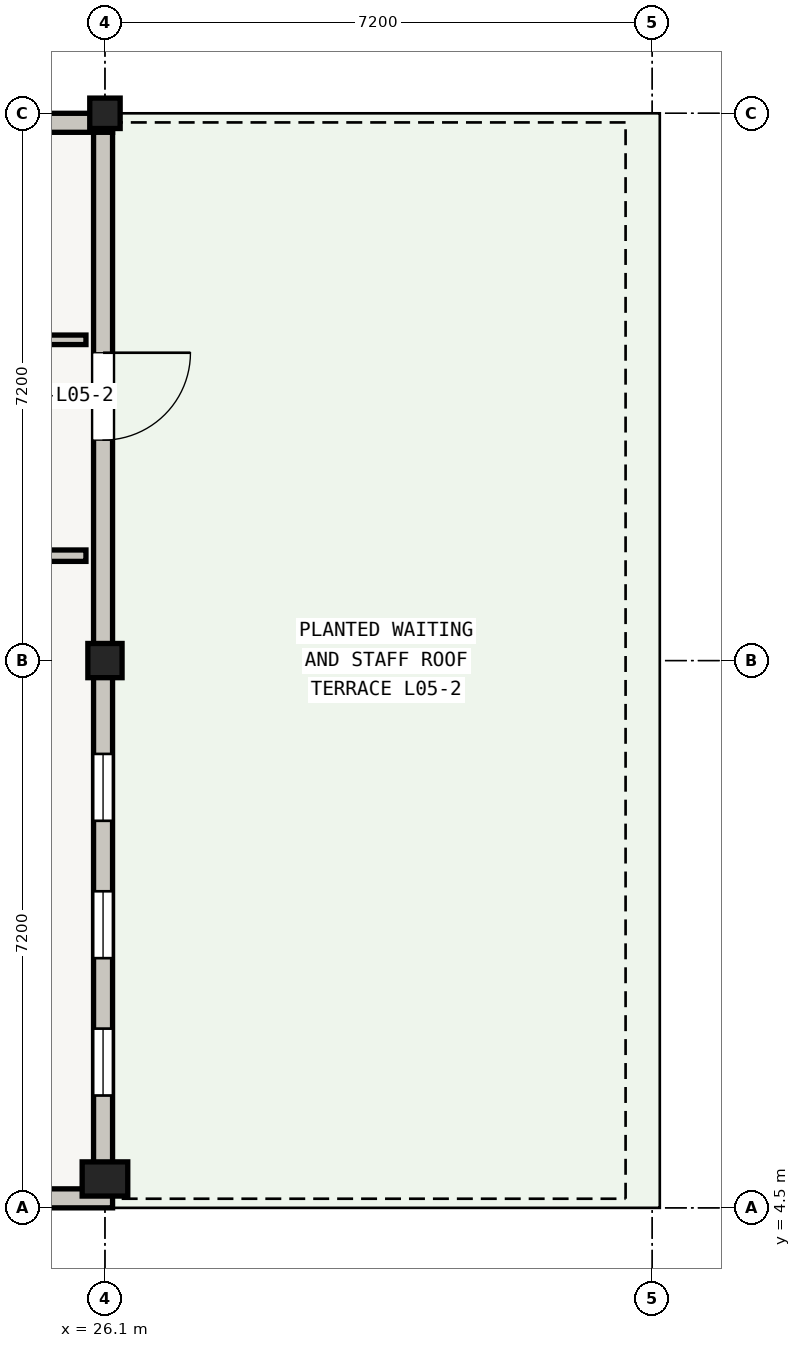
"""IFC4 building model, lengths in metres.
Left out: names, types, materials, properties, quantities, classifications, styles, units other than length and angle.
Written with IfcOpenShell. Run it as: python <this file> out.ifc"""

import sys

from ifc_helpers import new_model, si_unit, direction, frame, frame_2d, origin, origin_2d, place, context, subcontext, project, spatial, rectangle, extrude, element, fill, save


model = new_model("IFC4")
c1 = context("Model", 3, precision=1e-05, world=origin(), true_north=direction((0.0, 1.0)))
c2 = subcontext(c1, "Body", "Model", "MODEL_VIEW")
j1 = project(units=[si_unit("LENGTHUNIT", "METRE"), si_unit("PLANEANGLEUNIT", "RADIAN")], contexts=[c1])
p1 = place(None, origin())
s1 = spatial("IfcSite", under=j1, at=p1, CompositionType="ELEMENT")
p2 = place(p1, origin())
s2 = spatial("IfcBuilding", under=s1, at=p2, CompositionType="ELEMENT")
p3 = place(p2, frame((0.0, 0.0, 21.15)))
s3 = spatial("IfcBuildingStorey", under=s2, at=p3, CompositionType="ELEMENT", Elevation=21.15)
p4 = place(p3, frame((26.1, 4.88, 0.0), z_axis=(0.0, 0.0, 1.0), x_axis=(1.0, 0.0, 0.0)))
e1 = element("IfcColumn", 1, at=p4, inside=s3, PredefinedType="COLUMN", context=c2, shape_type="SweptSolid", body=[
    extrude(rectangle(XDim=0.6, YDim=0.45, at=origin_2d()), origin(), (0.0, 0.0, 1.0), 3.62),
])
p5 = place(p3, frame((26.1, 11.7, 0.0), z_axis=(0.0, 0.0, 1.0), x_axis=(1.0, 0.0, 0.0)))
e2 = element("IfcColumn", 2, at=p5, inside=s3, PredefinedType="COLUMN", context=c2, shape_type="SweptSolid", body=[
    extrude(rectangle(XDim=0.45, YDim=0.45, at=origin_2d()), origin(), (0.0, 0.0, 1.0), 3.62),
])
p6 = place(p3, frame((26.1, 18.9, 0.0), z_axis=(0.0, 0.0, 1.0), x_axis=(1.0, 0.0, 0.0)))
e3 = element("IfcColumn", 3, at=p6, inside=s3, PredefinedType="COLUMN", context=c2, shape_type="SweptSolid", body=[
    extrude(rectangle(XDim=0.4, YDim=0.4, at=origin_2d()), origin(), (0.0, 0.0, 1.0), 3.62),
])
p7 = place(p3, frame((18.9, 18.775, 0.0), z_axis=(0.0, 0.0, 1.0), x_axis=(1.0, 0.0, 0.0)))
e4 = element("IfcWall", 4, at=p7, inside=s3, PredefinedType="STANDARD", context=c2, shape_type="SweptSolid", body=[
    extrude(rectangle(XDim=7.3, YDim=0.25, at=frame_2d((3.65, 0.0))), origin(), (0.0, 0.0, 1.0), 2.655),
])
p8 = place(p7, frame((1.432, 0.0, 0.55)))
e5 = element("IfcOpeningElement", 5, at=p8, cuts=e4, PredefinedType="OPENING", context=c2, shape_type="SweptSolid", body=[
    extrude(rectangle(XDim=0.64, YDim=1.85, at=frame_2d((0.32, 0.925))), frame((0.0, 0.125, 0.0), z_axis=(0.0, -1.0, 0.0), x_axis=(1.0, 0.0, 0.0)), (0.0, 0.0, 1.0), 0.25),
])
p9 = place(p7, frame((3.33, 0.0, 0.55)))
e6 = element("IfcOpeningElement", 6, at=p9, cuts=e4, PredefinedType="OPENING", context=c2, shape_type="SweptSolid", body=[
    extrude(rectangle(XDim=0.64, YDim=1.85, at=frame_2d((0.32, 0.925))), frame((0.0, 0.125, 0.0), z_axis=(0.0, -1.0, 0.0), x_axis=(1.0, 0.0, 0.0)), (0.0, 0.0, 1.0), 0.25),
])
p10 = place(p7, frame((5.228, 0.0, 0.55)))
e7 = element("IfcOpeningElement", 7, at=p10, cuts=e4, PredefinedType="OPENING", context=c2, shape_type="SweptSolid", body=[
    extrude(rectangle(XDim=0.64, YDim=1.85, at=frame_2d((0.32, 0.925))), frame((0.0, 0.125, 0.0), z_axis=(0.0, -1.0, 0.0), x_axis=(1.0, 0.0, 0.0)), (0.0, 0.0, 1.0), 0.25),
])
p11 = place(p3, frame((26.075, 18.65, 0.0), z_axis=(0.0, 0.0, 1.0), x_axis=(0.0, -1.0, 0.0)))
e8 = element("IfcWall", 8, at=p11, inside=s3, PredefinedType="STANDARD", context=c2, shape_type="SweptSolid", body=[
    extrude(rectangle(XDim=6.95, YDim=0.25, at=frame_2d((3.475, 0.0))), origin(), (0.0, 0.0, 1.0), 2.655),
])
p12 = place(p11, frame((2.9, 0.0, 0.19)))
e9 = element("IfcOpeningElement", 9, at=p12, cuts=e8, PredefinedType="OPENING", context=c2, shape_type="SweptSolid", body=[
    extrude(rectangle(XDim=1.15, YDim=2.02, at=frame_2d((0.575, 1.01))), frame((0.0, 0.125, 0.0), z_axis=(0.0, -1.0, 0.0), x_axis=(1.0, 0.0, 0.0)), (0.0, 0.0, 1.0), 0.25),
])
p13 = place(p3, frame((26.075, 11.7, 0.0), z_axis=(0.0, 0.0, 1.0), x_axis=(0.0, -1.0, 0.0)))
e10 = element("IfcWall", 10, at=p13, inside=s3, PredefinedType="STANDARD", context=c2, shape_type="SweptSolid", body=[
    extrude(rectangle(XDim=6.95, YDim=0.25, at=frame_2d((3.475, 0.0))), origin(), (0.0, 0.0, 1.0), 2.655),
])
p14 = place(p13, frame((1.228, 0.0, 0.55)))
e11 = element("IfcOpeningElement", 11, at=p14, cuts=e10, PredefinedType="OPENING", context=c2, shape_type="SweptSolid", body=[
    extrude(rectangle(XDim=0.88, YDim=1.8, at=frame_2d((0.44, 0.9))), frame((0.0, 0.125, 0.0), z_axis=(0.0, -1.0, 0.0), x_axis=(1.0, 0.0, 0.0)), (0.0, 0.0, 1.0), 0.25),
])
p15 = place(p13, frame((3.035, 0.0, 0.55)))
e12 = element("IfcOpeningElement", 12, at=p15, cuts=e10, PredefinedType="OPENING", context=c2, shape_type="SweptSolid", body=[
    extrude(rectangle(XDim=0.88, YDim=1.8, at=frame_2d((0.44, 0.9))), frame((0.0, 0.125, 0.0), z_axis=(0.0, -1.0, 0.0), x_axis=(1.0, 0.0, 0.0)), (0.0, 0.0, 1.0), 0.25),
])
p16 = place(p13, frame((4.842, 0.0, 0.55)))
e13 = element("IfcOpeningElement", 13, at=p16, cuts=e10, PredefinedType="OPENING", context=c2, shape_type="SweptSolid", body=[
    extrude(rectangle(XDim=0.88, YDim=1.8, at=frame_2d((0.44, 0.9))), frame((0.0, 0.125, 0.0), z_axis=(0.0, -1.0, 0.0), x_axis=(1.0, 0.0, 0.0)), (0.0, 0.0, 1.0), 0.25),
])
p17 = place(p3, frame((26.2, 4.625, 0.0), z_axis=(0.0, 0.0, 1.0), x_axis=(-1.0, 0.0, 0.0)))
e14 = element("IfcWall", 14, at=p17, inside=s3, PredefinedType="STANDARD", context=c2, shape_type="SweptSolid", body=[
    extrude(rectangle(XDim=7.3, YDim=0.25, at=frame_2d((3.65, 0.0))), origin(), (0.0, 0.0, 1.0), 3.055),
])
p18 = place(p17, frame((1.362, 0.0, 0.55)))
e15 = element("IfcOpeningElement", 15, at=p18, cuts=e14, PredefinedType="OPENING", context=c2, shape_type="SweptSolid", body=[
    extrude(rectangle(XDim=0.78, YDim=1.95, at=frame_2d((0.39, 0.975))), frame((0.0, 0.125, 0.0), z_axis=(0.0, -1.0, 0.0), x_axis=(1.0, 0.0, 0.0)), (0.0, 0.0, 1.0), 0.25),
])
p19 = place(p17, frame((3.26, 0.0, 0.55)))
e16 = element("IfcOpeningElement", 16, at=p19, cuts=e14, PredefinedType="OPENING", context=c2, shape_type="SweptSolid", body=[
    extrude(rectangle(XDim=0.78, YDim=1.95, at=frame_2d((0.39, 0.975))), frame((0.0, 0.125, 0.0), z_axis=(0.0, -1.0, 0.0), x_axis=(1.0, 0.0, 0.0)), (0.0, 0.0, 1.0), 0.25),
])
p20 = place(p3, frame((16.67, 13.08, 0.0), z_axis=(0.0, 0.0, 1.0), x_axis=(1.0, 0.0, 0.0)))
e17 = element("IfcWall", 17, at=p20, inside=s3, PredefinedType="PARTITIONING", context=c2, shape_type="SweptSolid", body=[
    extrude(rectangle(XDim=9.18, YDim=0.15, at=frame_2d((4.59, 0.0))), origin(), (0.0, 0.0, 1.0), 2.64),
])
p21 = place(p20, frame((4.09, 0.0, 0.0)))
e18 = element("IfcOpeningElement", 18, at=p21, cuts=e17, PredefinedType="OPENING", context=c2, shape_type="SweptSolid", body=[
    extrude(rectangle(XDim=1.0, YDim=2.05, at=frame_2d((0.5, 1.025))), frame((0.0, 0.075, 0.0), z_axis=(0.0, -1.0, 0.0), x_axis=(1.0, 0.0, 0.0)), (0.0, 0.0, 1.0), 0.15),
])
p22 = place(p3, frame((25.85, 15.92, 0.0), z_axis=(0.0, 0.0, 1.0), x_axis=(-1.0, 0.0, 0.0)))
e19 = element("IfcWall", 19, at=p22, inside=s3, PredefinedType="PARTITIONING", context=c2, shape_type="SweptSolid", body=[
    extrude(rectangle(XDim=9.18, YDim=0.125, at=frame_2d((4.59, 0.0))), origin(), (0.0, 0.0, 1.0), 2.64),
])
p23 = place(p12, origin())
e20 = element("IfcDoor", 20, at=p23, inside=s3, OperationType="SINGLE_SWING_LEFT", PredefinedType="DOOR", context=c2, shape_type="SweptSolid", body=[
    extrude(rectangle(XDim=1.15, YDim=2.02, at=frame_2d((0.575, 1.01))), frame((0.0, 0.025, 0.0), z_axis=(0.0, -1.0, 0.0), x_axis=(1.0, 0.0, 0.0)), (0.0, 0.0, 1.0), 0.05),
])
fill(e9, e20)
p24 = place(p14, origin())
e21 = element("IfcWindow", 21, at=p24, inside=s3, PartitioningType="SINGLE_PANEL", PredefinedType="WINDOW", context=c2, shape_type="SweptSolid", body=[
    extrude(rectangle(XDim=0.88, YDim=1.8, at=frame_2d((0.44, 0.9))), frame((0.0, 0.03, 0.0), z_axis=(0.0, -1.0, 0.0), x_axis=(1.0, 0.0, 0.0)), (0.0, 0.0, 1.0), 0.06),
])
fill(e11, e21)
p25 = place(p15, origin())
e22 = element("IfcWindow", 22, at=p25, inside=s3, PartitioningType="SINGLE_PANEL", PredefinedType="WINDOW", context=c2, shape_type="SweptSolid", body=[
    extrude(rectangle(XDim=0.88, YDim=1.8, at=frame_2d((0.44, 0.9))), frame((0.0, 0.03, 0.0), z_axis=(0.0, -1.0, 0.0), x_axis=(1.0, 0.0, 0.0)), (0.0, 0.0, 1.0), 0.06),
])
fill(e12, e22)
p26 = place(p16, origin())
e23 = element("IfcWindow", 23, at=p26, inside=s3, PartitioningType="SINGLE_PANEL", PredefinedType="WINDOW", context=c2, shape_type="SweptSolid", body=[
    extrude(rectangle(XDim=0.88, YDim=1.8, at=frame_2d((0.44, 0.9))), frame((0.0, 0.03, 0.0), z_axis=(0.0, -1.0, 0.0), x_axis=(1.0, 0.0, 0.0)), (0.0, 0.0, 1.0), 0.06),
])
fill(e13, e23)
save(model, sys.argv[1])
